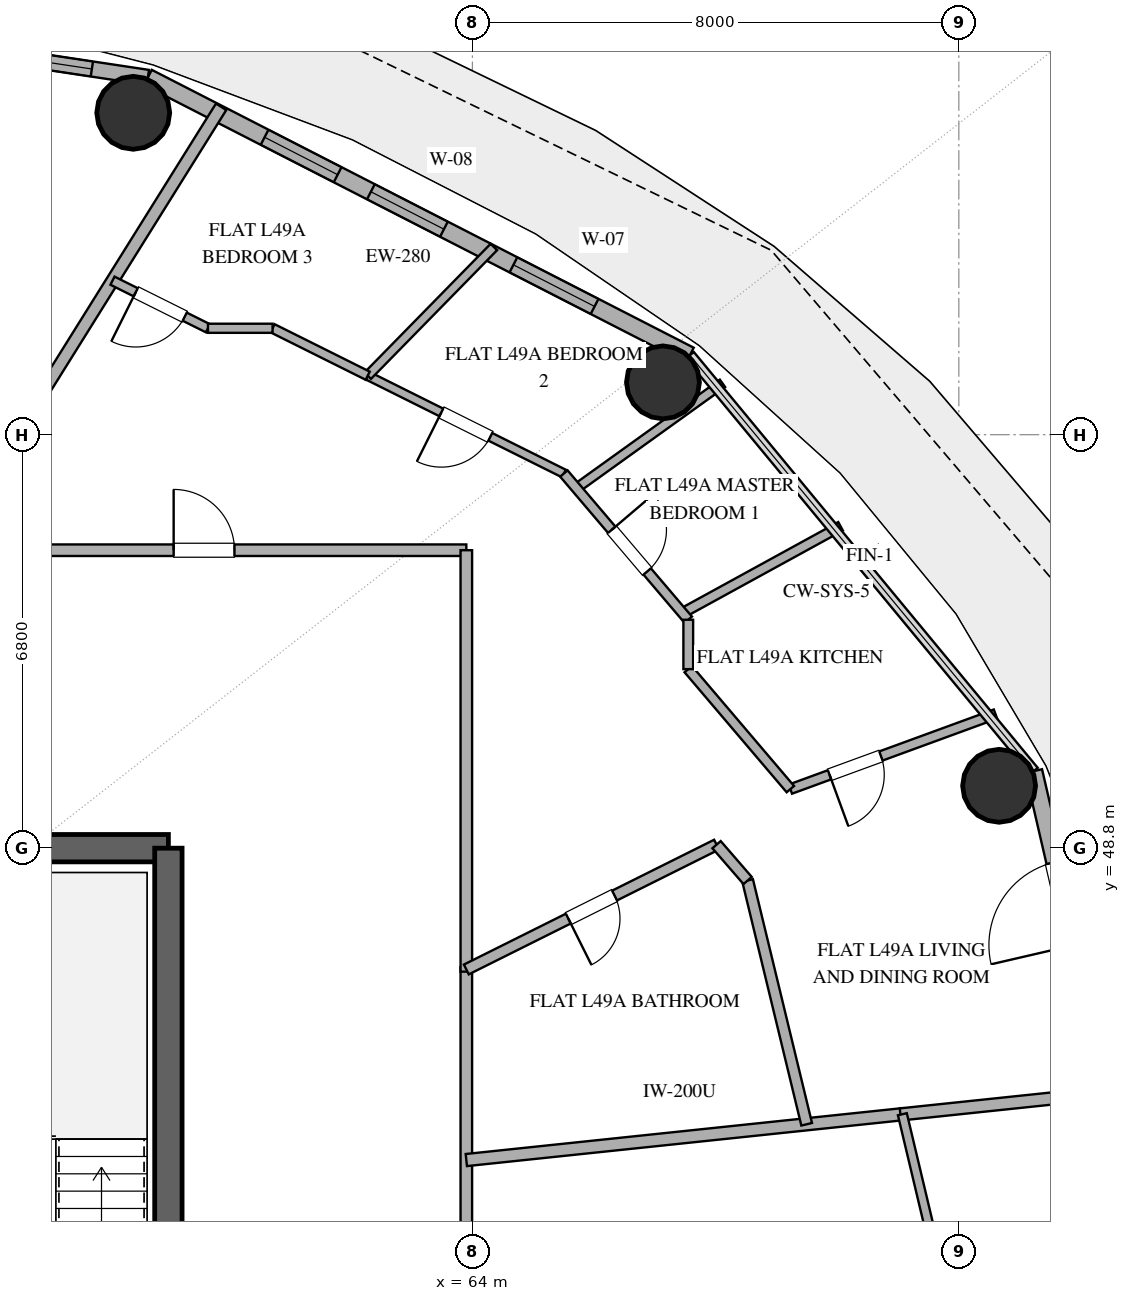
"""IFC4 building model, lengths in metres.
Left out: names, types, materials, properties, quantities, classifications, styles, units other than length and angle.
Written with IfcOpenShell. Run it as: python <this file> out.ifc"""

import sys

from ifc_helpers import new_model, si_unit, direction, frame, frame_2d, origin, origin_2d, place, context, subcontext, project, spatial, rectangle, hollow_circle, extrude, element, fill, save


model = new_model("IFC4")
c1 = context("Model", 3, precision=1e-05, world=origin(), true_north=direction((0.0, 1.0)))
c2 = subcontext(c1, "Body", "Model", "MODEL_VIEW")
j1 = project(units=[si_unit("LENGTHUNIT", "METRE"), si_unit("PLANEANGLEUNIT", "RADIAN")], contexts=[c1])
p1 = place(None, origin())
s1 = spatial("IfcSite", under=j1, at=p1, CompositionType="ELEMENT")
p2 = place(p1, origin())
s2 = spatial("IfcBuilding", under=s1, at=p2, CompositionType="ELEMENT")
p3 = place(p2, frame((0.0, 0.0, 193.8)))
s3 = spatial("IfcBuildingStorey", under=s2, at=p3, CompositionType="ELEMENT", Elevation=193.8)
p4 = place(p3, frame((55.0, 48.8, 0.0), z_axis=(0.0, 0.0, 1.0), x_axis=(1.0, 0.0, 0.0)))
e1 = element("IfcWall", 1, at=p4, inside=s3, PredefinedType="SHEAR", context=c2, shape_type="SweptSolid", body=[
    extrude(rectangle(XDim=4.0, YDim=0.45, at=frame_2d((2.0, 0.0))), origin(), (0.0, 0.0, 1.0), 3.38),
])
p5 = place(p3, frame((59.0, 35.2, 0.0), z_axis=(0.0, 0.0, 1.0), x_axis=(0.0, 1.0, 0.0)))
e2 = element("IfcWall", 2, at=p5, inside=s3, PredefinedType="SHEAR", context=c2, shape_type="SweptSolid", body=[
    extrude(rectangle(XDim=13.6, YDim=0.45, at=frame_2d((6.8, 0.0))), origin(), (0.0, 0.0, 1.0), 3.38),
])
for number, where, z_axis, x_axis in (
    (3, (72.662, 49.826, 0.0), (0.0, 0.0, 1.0), (1.0, 0.0, 0.0)),
    (4, (67.134, 56.46, 0.0), (0.0, 0.0, 1.0), (1.0, 0.0, 0.0)),
    (5, (58.422, 60.893, 0.0), (0.0, 0.0, 1.0), (1.0, 0.0, 0.0)),
):
    element("IfcColumn", number, at=place(p3, frame(where, z_axis=z_axis, x_axis=x_axis)), inside=s3, PredefinedType="COLUMN", context=c2, shape_type="SweptSolid", body=[
        extrude(hollow_circle(Radius=0.6, WallThickness=0.032, at=origin_2d()), origin(), (0.0, 0.0, 1.0), 3.38),
    ])
p6 = place(p3, frame((75.099, 42.0, 0.0), z_axis=(0.0, 0.0, 1.0), x_axis=(-0.225473184558, 0.974249374157, 0.0)))
e6 = element("IfcWall", 6, at=p6, inside=s3, PredefinedType="SOLIDWALL", context=c2, shape_type="SweptSolid", body=[
    extrude(rectangle(XDim=8.28, YDim=0.28, at=frame_2d((4.14, 0.0))), origin(), (0.0, 0.0, 1.0), 3.38),
])
p7 = place(p6, frame((5.344, 0.0, 0.0)))
e7 = element("IfcOpeningElement", 7, at=p7, cuts=e6, PredefinedType="OPENING", context=c2, shape_type="SweptSolid", body=[
    extrude(rectangle(XDim=1.4, YDim=2.2, at=frame_2d((0.7, 1.1))), frame((0.0, 0.15, 0.0), z_axis=(0.0, -1.0, 0.0), x_axis=(1.0, 0.0, 0.0)), (0.0, 0.0, 1.0), 0.3),
])
p8 = place(p6, frame((0.918, 0.0, 0.85)))
e8 = element("IfcOpeningElement", 8, at=p8, cuts=e6, PredefinedType="OPENING", context=c2, shape_type="SweptSolid", body=[
    extrude(rectangle(XDim=1.0, YDim=1.8, at=frame_2d((0.5, 0.9))), frame((0.0, 0.15, 0.0), z_axis=(0.0, -1.0, 0.0), x_axis=(1.0, 0.0, 0.0)), (0.0, 0.0, 1.0), 0.3),
])
p9 = place(p3, frame((67.576, 56.906, 0.0), z_axis=(0.0, 0.0, 1.0), x_axis=(-0.889872523182, 0.456209263919, 0.0)))
e9 = element("IfcWall", 9, at=p9, inside=s3, PredefinedType="SOLIDWALL", context=c2, shape_type="SweptSolid", body=[
    extrude(rectangle(XDim=10.016, YDim=0.28, at=frame_2d((5.008, 0.0))), origin(), (0.0, 0.0, 1.0), 3.38),
])
p10 = place(p9, frame((1.76, 0.0, 0.85)))
e10 = element("IfcOpeningElement", 10, at=p10, cuts=e9, PredefinedType="OPENING", context=c2, shape_type="SweptSolid", body=[
    extrude(rectangle(XDim=1.5, YDim=1.8, at=frame_2d((0.75, 0.9))), frame((0.0, 0.15, 0.0), z_axis=(0.0, -1.0, 0.0), x_axis=(1.0, 0.0, 0.0)), (0.0, 0.0, 1.0), 0.3),
])
p11 = place(p9, frame((4.545, 0.0, 0.85)))
e11 = element("IfcOpeningElement", 11, at=p11, cuts=e9, PredefinedType="OPENING", context=c2, shape_type="SweptSolid", body=[
    extrude(rectangle(XDim=1.35, YDim=1.8, at=frame_2d((0.675, 0.9))), frame((0.0, 0.15, 0.0), z_axis=(0.0, -1.0, 0.0), x_axis=(1.0, 0.0, 0.0)), (0.0, 0.0, 1.0), 0.3),
])
p12 = place(p9, frame((6.51, 0.0, 0.85)))
e12 = element("IfcOpeningElement", 12, at=p12, cuts=e9, PredefinedType="OPENING", context=c2, shape_type="SweptSolid", body=[
    extrude(rectangle(XDim=1.35, YDim=1.8, at=frame_2d((0.675, 0.9))), frame((0.0, 0.15, 0.0), z_axis=(0.0, -1.0, 0.0), x_axis=(1.0, 0.0, 0.0)), (0.0, 0.0, 1.0), 0.3),
])
p13 = place(p3, frame((58.663, 61.475, 0.0), z_axis=(0.0, 0.0, 1.0), x_axis=(-0.988863993413, 0.148822049884, 0.0)))
e13 = element("IfcWall", 13, at=p13, inside=s3, PredefinedType="SOLIDWALL", context=c2, shape_type="SweptSolid", body=[
    extrude(rectangle(XDim=10.783, YDim=0.25, at=frame_2d((5.392, 0.0))), origin(), (0.0, 0.0, 1.0), 3.38),
])
p14 = place(p13, frame((0.932, 0.0, 0.35)))
e14 = element("IfcOpeningElement", 14, at=p14, cuts=e13, PredefinedType="OPENING", context=c2, shape_type="SweptSolid", body=[
    extrude(rectangle(XDim=1.0, YDim=1.05, at=frame_2d((0.5, 0.525))), frame((0.0, 0.135, 0.0), z_axis=(0.0, -1.0, 0.0), x_axis=(1.0, 0.0, 0.0)), (0.0, 0.0, 1.0), 0.27),
])
p15 = place(p3, frame((44.784, 53.7, 0.0), z_axis=(0.0, 0.0, 1.0), x_axis=(1.0, 0.0, 0.0)))
e15 = element("IfcWall", 15, at=p15, inside=s3, PredefinedType="PARTITIONING", context=c2, shape_type="SweptSolid", body=[
    extrude(rectangle(XDim=19.116, YDim=0.19, at=frame_2d((9.558, 0.0))), origin(), (0.0, 0.0, 1.0), 2.74),
])
p16 = place(p15, frame((14.302, 0.0, 0.0)))
e16 = element("IfcOpeningElement", 16, at=p16, cuts=e15, PredefinedType="OPENING", context=c2, shape_type="SweptSolid", body=[
    extrude(rectangle(XDim=1.0, YDim=2.2, at=frame_2d((0.5, 1.1))), frame((0.0, 0.105, 0.0), z_axis=(0.0, -1.0, 0.0), x_axis=(1.0, 0.0, 0.0)), (0.0, 0.0, 1.0), 0.21),
])
p17 = place(p15, frame((6.783, 0.0, 0.0)))
e17 = element("IfcOpeningElement", 17, at=p17, cuts=e15, PredefinedType="OPENING", context=c2, shape_type="SweptSolid", body=[
    extrude(rectangle(XDim=1.0, YDim=2.2, at=frame_2d((0.5, 1.1))), frame((0.0, 0.105, 0.0), z_axis=(0.0, -1.0, 0.0), x_axis=(1.0, 0.0, 0.0)), (0.0, 0.0, 1.0), 0.21),
])
p18 = place(p3, frame((63.9, 46.841, 0.0), z_axis=(0.0, 0.0, 1.0), x_axis=(0.0, -1.0, 0.0)))
e18 = element("IfcWall", 18, at=p18, inside=s3, PredefinedType="PARTITIONING", context=c2, shape_type="SweptSolid", body=[
    extrude(rectangle(XDim=12.632, YDim=0.19, at=frame_2d((6.316, 0.0))), origin(), (0.0, 0.0, 1.0), 2.74),
])
p19 = place(p3, frame((63.9, 53.7, 0.0), z_axis=(0.0, 0.0, 1.0), x_axis=(0.0, -1.0, 0.0)))
e19 = element("IfcWall", 19, at=p19, inside=s3, PredefinedType="PARTITIONING", context=c2, shape_type="SweptSolid", body=[
    extrude(rectangle(XDim=6.931, YDim=0.19, at=frame_2d((3.465, 0.0))), origin(), (0.0, 0.0, 1.0), 2.74),
])
p20 = place(p3, frame((63.9, 43.671, 0.0), z_axis=(0.0, 0.0, 1.0), x_axis=(0.994523063153, 0.104517351942, 0.0)))
e20 = element("IfcWall", 20, at=p20, inside=s3, PredefinedType="PARTITIONING", context=c2, shape_type="SweptSolid", body=[
    extrude(rectangle(XDim=7.211, YDim=0.2, at=frame_2d((3.605, 0.0))), origin(), (0.0, 0.0, 1.0), 2.74),
])
p21 = place(p3, frame((55.311, 53.7, 0.0), z_axis=(0.0, 0.0, 1.0), x_axis=(0.529914717401, 0.848050937315, 0.0)))
e21 = element("IfcWall", 21, at=p21, inside=s3, PredefinedType="PARTITIONING", context=c2, shape_type="SweptSolid", body=[
    extrude(rectangle(XDim=8.599, YDim=0.2, at=frame_2d((4.299, 0.0))), origin(), (0.0, 0.0, 1.0), 2.74),
])
p22 = place(p3, frame((68.016, 48.858, 0.0), z_axis=(0.0, 0.0, 1.0), x_axis=(-0.894872643331, -0.446321579377, 0.0)))
e22 = element("IfcWall", 22, at=p22, inside=s3, PredefinedType="PLUMBINGWALL", context=c2, shape_type="SweptSolid", body=[
    extrude(rectangle(XDim=4.599, YDim=0.18, at=frame_2d((2.3, 0.0))), origin(), (0.0, 0.0, 1.0), 2.74),
])
p23 = place(p22, frame((1.875, 0.0, 0.0)))
e23 = element("IfcOpeningElement", 23, at=p23, cuts=e22, PredefinedType="OPENING", context=c2, shape_type="SweptSolid", body=[
    extrude(rectangle(XDim=0.85, YDim=2.1, at=frame_2d((0.425, 1.05))), frame((0.0, 0.1, 0.0), z_axis=(0.0, -1.0, 0.0), x_axis=(1.0, 0.0, 0.0)), (0.0, 0.0, 1.0), 0.2),
])
p24 = place(p3, frame((69.498, 44.26, 0.0), z_axis=(0.0, 0.0, 1.0), x_axis=(-0.235510241151, 0.97187186723, 0.0)))
e24 = element("IfcWall", 24, at=p24, inside=s3, PredefinedType="PLUMBINGWALL", context=c2, shape_type="SweptSolid", body=[
    extrude(rectangle(XDim=4.125, YDim=0.18, at=frame_2d((2.062, 0.0))), origin(), (0.0, 0.0, 1.0), 2.74),
])
p25 = place(p3, frame((65.505, 54.961, 0.0), z_axis=(0.0, 0.0, 1.0), x_axis=(-0.894941244144, 0.4461840086, 0.0)))
e25 = element("IfcWall", 25, at=p25, inside=s3, PredefinedType="PARTITIONING", context=c2, shape_type="SweptSolid", body=[
    extrude(rectangle(XDim=3.605, YDim=0.14, at=frame_2d((1.803, 0.0))), origin(), (0.0, 0.0, 1.0), 2.74),
])
p26 = place(p25, frame((1.353, 0.0, 0.0)))
e26 = element("IfcOpeningElement", 26, at=p26, cuts=e25, PredefinedType="OPENING", context=c2, shape_type="SweptSolid", body=[
    extrude(rectangle(XDim=0.9, YDim=2.1, at=frame_2d((0.45, 1.05))), frame((0.0, 0.08, 0.0), z_axis=(0.0, -1.0, 0.0), x_axis=(1.0, 0.0, 0.0)), (0.0, 0.0, 1.0), 0.16),
])
p27 = place(p3, frame((72.603, 51.006, 0.0), z_axis=(0.0, 0.0, 1.0), x_axis=(-0.939057046145, -0.343761347572, 0.0)))
e27 = element("IfcWall", 27, at=p27, inside=s3, PredefinedType="PLUMBINGWALL", context=c2, shape_type="SweptSolid", body=[
    extrude(rectangle(XDim=3.592, YDim=0.16, at=frame_2d((1.796, 0.0))), origin(), (0.0, 0.0, 1.0), 2.74),
])
p28 = place(p27, frame((2.006, 0.0, 0.0)))
e28 = element("IfcOpeningElement", 28, at=p28, cuts=e27, PredefinedType="OPENING", context=c2, shape_type="SweptSolid", body=[
    extrude(rectangle(XDim=0.9, YDim=2.1, at=frame_2d((0.45, 1.05))), frame((0.0, 0.09, 0.0), z_axis=(0.0, -1.0, 0.0), x_axis=(1.0, 0.0, 0.0)), (0.0, 0.0, 1.0), 0.18),
])
p29 = place(p3, frame((74.575, 44.793, 0.0), z_axis=(0.0, 0.0, 1.0), x_axis=(-0.994516359121, -0.104581123727, 0.0)))
e29 = element("IfcWall", 29, at=p29, inside=s3, PredefinedType="PARTITIONING", context=c2, shape_type="SweptSolid", body=[
    extrude(rectangle(XDim=3.555, YDim=0.2, at=frame_2d((1.778, 0.0))), origin(), (0.0, 0.0, 1.0), 2.74),
])
p30 = place(p3, frame((67.455, 52.668, 0.0), z_axis=(0.0, 0.0, 1.0), x_axis=(0.876839283097, 0.480783601653, 0.0)))
e30 = element("IfcWall", 30, at=p30, inside=s3, PredefinedType="PLUMBINGWALL", context=c2, shape_type="SweptSolid", body=[
    extrude(rectangle(XDim=2.965, YDim=0.16, at=frame_2d((1.482, 0.0))), origin(), (0.0, 0.0, 1.0), 2.74),
])
p31 = place(p3, frame((64.353, 58.687, 0.0), z_axis=(0.0, 0.0, 1.0), x_axis=(-0.699905055024, -0.714235895172, 0.0)))
e31 = element("IfcWall", 31, at=p31, inside=s3, PredefinedType="PARTITIONING", context=c2, shape_type="SweptSolid", body=[
    extrude(rectangle(XDim=2.964, YDim=0.15, at=frame_2d((1.482, 0.0))), origin(), (0.0, 0.0, 1.0), 2.74),
])
p32 = place(p3, frame((68.113, 56.444, 0.0), z_axis=(0.0, 0.0, 1.0), x_axis=(-0.812258557349, -0.583297553581, 0.0)))
e32 = element("IfcWall", 32, at=p32, inside=s3, PredefinedType="PARTITIONING", context=c2, shape_type="SweptSolid", body=[
    extrude(rectangle(XDim=2.958, YDim=0.15, at=frame_2d((1.479, 0.0))), origin(), (0.0, 0.0, 1.0), 2.74),
])
p33 = place(p3, frame((65.505, 54.961, 0.0), z_axis=(0.0, 0.0, 1.0), x_axis=(0.647888606369, -0.761735094201, 0.0)))
e33 = element("IfcWall", 33, at=p33, inside=s3, PredefinedType="PLUMBINGWALL", context=c2, shape_type="SweptSolid", body=[
    extrude(rectangle(XDim=3.157, YDim=0.16, at=frame_2d((1.578, 0.0))), origin(), (0.0, 0.0, 1.0), 2.74),
])
p34 = place(p33, frame((1.215, 0.0, 0.0)))
e34 = element("IfcOpeningElement", 34, at=p34, cuts=e33, PredefinedType="OPENING", context=c2, shape_type="SweptSolid", body=[
    extrude(rectangle(XDim=0.9, YDim=2.1, at=frame_2d((0.45, 1.05))), frame((0.0, 0.09, 0.0), z_axis=(0.0, -1.0, 0.0), x_axis=(1.0, 0.0, 0.0)), (0.0, 0.0, 1.0), 0.18),
])
p35 = place(p3, frame((69.229, 49.771, 0.0), z_axis=(0.0, 0.0, 1.0), x_axis=(-0.648055845939, 0.761592818076, 0.0)))
e35 = element("IfcWall", 35, at=p35, inside=s3, PredefinedType="PLUMBINGWALL", context=c2, shape_type="SweptSolid", body=[
    extrude(rectangle(XDim=2.591, YDim=0.16, at=frame_2d((1.295, 0.0))), origin(), (0.0, 0.0, 1.0), 2.74),
])
p36 = place(p3, frame((71.649, 42.0, 0.0), z_axis=(0.0, 0.0, 1.0), x_axis=(-0.231642596653, 0.972800959814, 0.0)))
e36 = element("IfcWall", 36, at=p36, inside=s3, PredefinedType="PARTITIONING", context=c2, shape_type="SweptSolid", body=[
    extrude(rectangle(XDim=2.493, YDim=0.15, at=frame_2d((1.246, 0.0))), origin(), (0.0, 0.0, 1.0), 2.74),
])
p37 = place(p3, frame((59.651, 57.35, 0.0), z_axis=(0.0, 0.0, 1.0), x_axis=(-0.895038630404, 0.445988621027, 0.0)))
e37 = element("IfcWall", 37, at=p37, inside=s3, PredefinedType="PARTITIONING", context=c2, shape_type="SweptSolid", body=[
    extrude(rectangle(XDim=1.754, YDim=0.15, at=frame_2d((0.877, 0.0))), origin(), (0.0, 0.0, 1.0), 2.74),
])
p38 = place(p37, frame((0.427, 0.0, 0.0)))
e38 = element("IfcOpeningElement", 38, at=p38, cuts=e37, PredefinedType="OPENING", context=c2, shape_type="SweptSolid", body=[
    extrude(rectangle(XDim=0.9, YDim=2.1, at=frame_2d((0.45, 1.05))), frame((0.0, 0.085, 0.0), z_axis=(0.0, -1.0, 0.0), x_axis=(1.0, 0.0, 0.0)), (0.0, 0.0, 1.0), 0.17),
])
p39 = place(p3, frame((62.278, 56.57, 0.0), z_axis=(0.0, 0.0, 1.0), x_axis=(-0.894929238491, 0.446208088333, 0.0)))
e39 = element("IfcWall", 39, at=p39, inside=s3, PredefinedType="PARTITIONING", context=c2, shape_type="SweptSolid", body=[
    extrude(rectangle(XDim=1.749, YDim=0.15, at=frame_2d((0.875, 0.0))), origin(), (0.0, 0.0, 1.0), 2.74),
])
p40 = place(p3, frame((60.713, 57.35, 0.0), z_axis=(0.0, 0.0, 1.0), x_axis=(-1.0, 0.0, 0.0)))
e40 = element("IfcWall", 40, at=p40, inside=s3, PredefinedType="PARTITIONING", context=c2, shape_type="SweptSolid", body=[
    extrude(rectangle(XDim=1.062, YDim=0.15, at=frame_2d((0.531, 0.0))), origin(), (0.0, 0.0, 1.0), 2.74),
])
p41 = place(p3, frame((67.55, 51.744, 0.0), z_axis=(0.0, 0.0, 1.0), x_axis=(0.0, 1.0, 0.0)))
e41 = element("IfcWall", 41, at=p41, inside=s3, PredefinedType="PLUMBINGWALL", context=c2, shape_type="SweptSolid", body=[
    extrude(rectangle(XDim=0.812, YDim=0.16, at=frame_2d((0.406, 0.0))), origin(), (0.0, 0.0, 1.0), 2.74),
])
p42 = place(p3, frame((68.526, 48.268, 0.0), z_axis=(0.0, 0.0, 1.0), x_axis=(-0.654572928685, 0.755998863116, 0.0)))
e42 = element("IfcWall", 42, at=p42, inside=s3, PredefinedType="PLUMBINGWALL", context=c2, shape_type="SweptSolid", body=[
    extrude(rectangle(XDim=0.78, YDim=0.18, at=frame_2d((0.39, 0.0))), origin(), (0.0, 0.0, 1.0), 2.74),
])
p43 = place(p10, origin())
e43 = element("IfcWindow", 43, at=p43, inside=s3, PartitioningType="SINGLE_PANEL", PredefinedType="WINDOW", context=c2, shape_type="SweptSolid", body=[
    extrude(rectangle(XDim=1.5, YDim=1.8, at=frame_2d((0.75, 0.9))), frame((0.0, 0.03, 0.0), z_axis=(0.0, -1.0, 0.0), x_axis=(1.0, 0.0, 0.0)), (0.0, 0.0, 1.0), 0.06),
])
fill(e10, e43)
p44 = place(p11, origin())
e44 = element("IfcWindow", 44, at=p44, inside=s3, PartitioningType="SINGLE_PANEL", PredefinedType="WINDOW", context=c2, shape_type="SweptSolid", body=[
    extrude(rectangle(XDim=1.35, YDim=1.8, at=frame_2d((0.675, 0.9))), frame((0.0, 0.03, 0.0), z_axis=(0.0, -1.0, 0.0), x_axis=(1.0, 0.0, 0.0)), (0.0, 0.0, 1.0), 0.06),
])
fill(e11, e44)
p45 = place(p12, origin())
e45 = element("IfcWindow", 45, at=p45, inside=s3, PartitioningType="SINGLE_PANEL", PredefinedType="WINDOW", context=c2, shape_type="SweptSolid", body=[
    extrude(rectangle(XDim=1.35, YDim=1.8, at=frame_2d((0.675, 0.9))), frame((0.0, 0.03, 0.0), z_axis=(0.0, -1.0, 0.0), x_axis=(1.0, 0.0, 0.0)), (0.0, 0.0, 1.0), 0.06),
])
fill(e12, e45)
p46 = place(p14, origin())
e46 = element("IfcWindow", 46, at=p46, inside=s3, PartitioningType="SINGLE_PANEL", PredefinedType="WINDOW", context=c2, shape_type="SweptSolid", body=[
    extrude(rectangle(XDim=1.0, YDim=1.05, at=frame_2d((0.5, 0.525))), frame((0.0, 0.03, 0.0), z_axis=(0.0, -1.0, 0.0), x_axis=(1.0, 0.0, 0.0)), (0.0, 0.0, 1.0), 0.06),
])
fill(e14, e46)
p47 = place(p16, origin())
e47 = element("IfcDoor", 47, at=p47, inside=s3, OperationType="SINGLE_SWING_LEFT", PredefinedType="DOOR", context=c2, shape_type="SweptSolid", body=[
    extrude(rectangle(XDim=1.0, YDim=2.2, at=frame_2d((0.5, 1.1))), frame((0.0, 0.025, 0.0), z_axis=(0.0, -1.0, 0.0), x_axis=(1.0, 0.0, 0.0)), (0.0, 0.0, 1.0), 0.05),
])
fill(e16, e47)
p48 = place(p23, origin())
e48 = element("IfcDoor", 48, at=p48, inside=s3, OperationType="SINGLE_SWING_RIGHT", PredefinedType="DOOR", context=c2, shape_type="SweptSolid", body=[
    extrude(rectangle(XDim=0.85, YDim=2.1, at=frame_2d((0.425, 1.05))), frame((0.0, 0.025, 0.0), z_axis=(0.0, -1.0, 0.0), x_axis=(1.0, 0.0, 0.0)), (0.0, 0.0, 1.0), 0.05),
])
fill(e23, e48)
p49 = place(p26, origin())
e49 = element("IfcDoor", 49, at=p49, inside=s3, OperationType="SINGLE_SWING_RIGHT", PredefinedType="DOOR", context=c2, shape_type="SweptSolid", body=[
    extrude(rectangle(XDim=0.9, YDim=2.1, at=frame_2d((0.45, 1.05))), frame((0.0, 0.025, 0.0), z_axis=(0.0, -1.0, 0.0), x_axis=(1.0, 0.0, 0.0)), (0.0, 0.0, 1.0), 0.05),
])
fill(e26, e49)
p50 = place(p28, origin())
e50 = element("IfcDoor", 50, at=p50, inside=s3, OperationType="SINGLE_SWING_RIGHT", PredefinedType="DOOR", context=c2, shape_type="SweptSolid", body=[
    extrude(rectangle(XDim=0.9, YDim=2.1, at=frame_2d((0.45, 1.05))), frame((0.0, 0.025, 0.0), z_axis=(0.0, -1.0, 0.0), x_axis=(1.0, 0.0, 0.0)), (0.0, 0.0, 1.0), 0.05),
])
fill(e28, e50)
p51 = place(p34, origin())
e51 = element("IfcDoor", 51, at=p51, inside=s3, OperationType="SINGLE_SWING_LEFT", PredefinedType="DOOR", context=c2, shape_type="SweptSolid", body=[
    extrude(rectangle(XDim=0.9, YDim=2.1, at=frame_2d((0.45, 1.05))), frame((0.0, 0.025, 0.0), z_axis=(0.0, -1.0, 0.0), x_axis=(1.0, 0.0, 0.0)), (0.0, 0.0, 1.0), 0.05),
])
fill(e34, e51)
p52 = place(p38, origin())
e52 = element("IfcDoor", 52, at=p52, inside=s3, OperationType="SINGLE_SWING_RIGHT", PredefinedType="DOOR", context=c2, shape_type="SweptSolid", body=[
    extrude(rectangle(XDim=0.9, YDim=2.1, at=frame_2d((0.45, 1.05))), frame((0.0, 0.025, 0.0), z_axis=(0.0, -1.0, 0.0), x_axis=(1.0, 0.0, 0.0)), (0.0, 0.0, 1.0), 0.05),
])
fill(e38, e52)
save(model, sys.argv[1])
